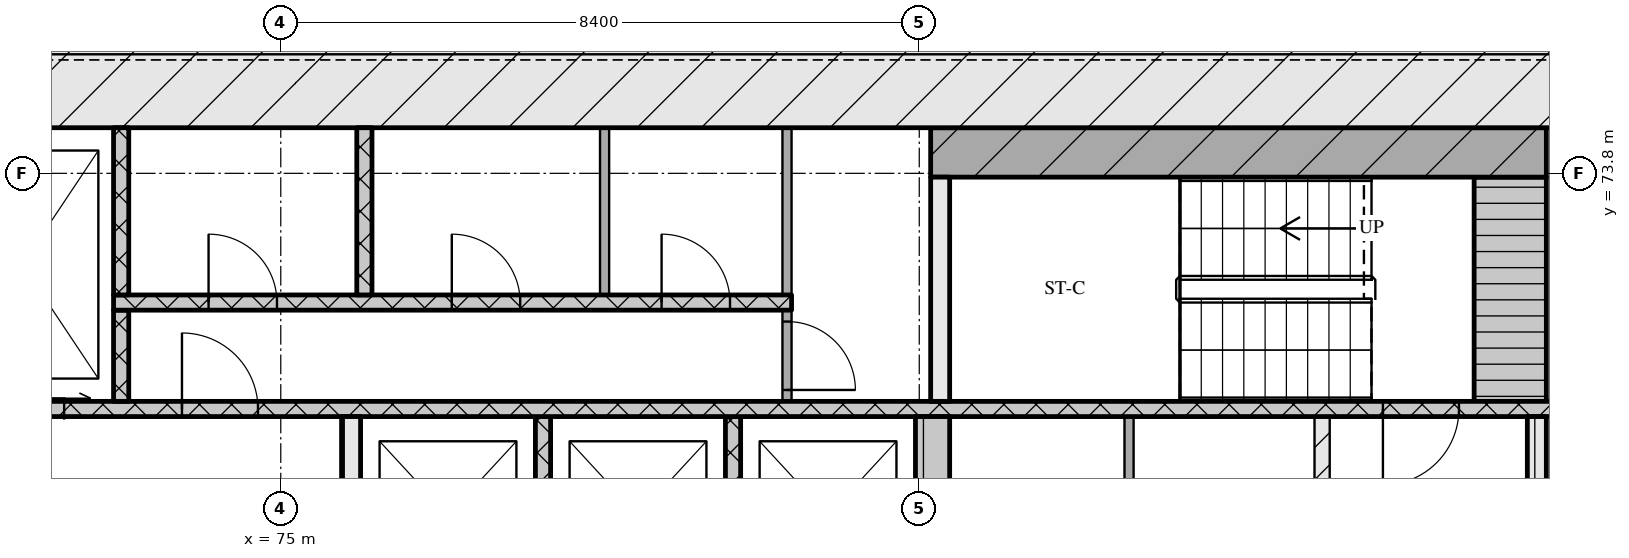
"""IFC4 building model, lengths in metres.
Left out: names, types, materials, properties, quantities, classifications, styles, units other than length and angle.
Written with IfcOpenShell. Run it as: python <this file> out.ifc"""

import sys

from ifc_helpers import new_model, si_unit, direction, frame, frame_2d, origin, place, context, subcontext, project, spatial, rectangle, extrude, element, fill, save


model = new_model("IFC4")
c1 = context("Model", 3, precision=1e-05, world=origin(), true_north=direction((0.0, 1.0)))
c2 = subcontext(c1, "Body", "Model", "MODEL_VIEW")
j1 = project(units=[si_unit("LENGTHUNIT", "METRE"), si_unit("PLANEANGLEUNIT", "RADIAN")], contexts=[c1])
p1 = place(None, origin())
s1 = spatial("IfcSite", under=j1, at=p1, CompositionType="ELEMENT")
p2 = place(p1, origin())
s2 = spatial("IfcBuilding", under=s1, at=p2, CompositionType="ELEMENT")
p3 = place(p2, frame((0.0, 0.0, 37.2)))
s3 = spatial("IfcBuildingStorey", under=s2, at=p3, CompositionType="ELEMENT", Elevation=37.2)
p4 = place(p3, frame((66.6, 75.0, 0.0), z_axis=(0.0, 0.0, 1.0), x_axis=(1.0, 0.0, 0.0)))
e1 = element("IfcWall", 1, at=p4, inside=s3, PredefinedType="SOLIDWALL", context=c2, shape_type="SweptSolid", body=[
    extrude(rectangle(XDim=42.0, YDim=1.2, at=frame_2d((21.0, 0.0))), origin(), (0.0, 0.0, 1.0), 3.32),
])
for number, where, z_axis, x_axis in (
    (2, (78.45, 68.0, 0.0), (0.0, 0.0, 1.0), (0.0, 1.0, 0.0)),
    (3, (80.95, 68.0, 0.0), (0.0, 0.0, 1.0), (0.0, 1.0, 0.0)),
):
    element("IfcWall", number, at=place(p3, frame(where, z_axis=z_axis, x_axis=x_axis)), inside=s3, PredefinedType="SOLIDWALL", context=c2, shape_type="SweptSolid", body=[
        extrude(rectangle(XDim=2.6, YDim=0.2, at=frame_2d((1.3, 0.0))), origin(), (0.0, 0.0, 1.0), 3.32),
    ])
p5 = place(p3, frame((83.575, 68.0, 0.0), z_axis=(0.0, 0.0, 1.0), x_axis=(0.0, 1.0, 0.0)))
e4 = element("IfcWall", 4, at=p5, inside=s3, PredefinedType="SOLIDWALL", context=c2, shape_type="SweptSolid", body=[
    extrude(rectangle(XDim=2.6, YDim=0.45, at=frame_2d((1.3, 0.0))), origin(), (0.0, 0.0, 1.0), 3.32),
])
p6 = place(p3, frame((86.16, 68.0, 0.0), z_axis=(0.0, 0.0, 1.0), x_axis=(0.0, 1.0, 0.0)))
e5 = element("IfcWall", 5, at=p6, inside=s3, PredefinedType="PARTITIONING", context=c2, shape_type="SweptSolid", body=[
    extrude(rectangle(XDim=2.6, YDim=0.12, at=frame_2d((1.3, 0.0))), origin(), (0.0, 0.0, 1.0), 3.32),
])
p7 = place(p3, frame((88.7, 68.0, 0.0), z_axis=(0.0, 0.0, 1.0), x_axis=(0.0, 1.0, 0.0)))
e6 = element("IfcWall", 6, at=p7, inside=s3, PredefinedType="PARTITIONING", context=c2, shape_type="SweptSolid", body=[
    extrude(rectangle(XDim=2.6, YDim=0.2, at=frame_2d((1.3, 0.0))), origin(), (0.0, 0.0, 1.0), 3.32),
])
p8 = place(p3, frame((91.525, 68.0, 0.0), z_axis=(0.0, 0.0, 1.0), x_axis=(0.0, 1.0, 0.0)))
e7 = element("IfcWall", 7, at=p8, inside=s3, PredefinedType="SOLIDWALL", context=c2, shape_type="SweptSolid", body=[
    extrude(rectangle(XDim=2.6, YDim=0.25, at=frame_2d((1.3, 0.0))), origin(), (0.0, 0.0, 1.0), 3.32),
])
p9 = place(p3, frame((75.925, 68.3, 0.0), z_axis=(0.0, 0.0, 1.0), x_axis=(0.0, 1.0, 0.0)))
e8 = element("IfcWall", 8, at=p9, inside=s3, PredefinedType="SOLIDWALL", context=c2, shape_type="SweptSolid", body=[
    extrude(rectangle(XDim=2.3, YDim=0.25, at=frame_2d((1.15, 0.0))), origin(), (0.0, 0.0, 1.0), 3.32),
])
p10 = place(p3, frame((67.8, 70.7, 0.0), z_axis=(0.0, 0.0, 1.0), x_axis=(1.0, 0.0, 0.0)))
e9 = element("IfcWall", 9, at=p10, inside=s3, PredefinedType="SOLIDWALL", context=c2, shape_type="SweptSolid", body=[
    extrude(rectangle(XDim=39.6, YDim=0.2, at=frame_2d((19.8, 0.0))), origin(), (0.0, 0.0, 1.0), 3.32),
])
p11 = place(p10, frame((0.65, 0.0, 0.0)))
e10 = element("IfcOpeningElement", 10, at=p11, cuts=e9, PredefinedType="OPENING", context=c2, shape_type="SweptSolid", body=[
    extrude(rectangle(XDim=1.1, YDim=2.1, at=frame_2d((0.55, 1.05))), frame((0.0, 0.11, 0.0), z_axis=(0.0, -1.0, 0.0), x_axis=(1.0, 0.0, 0.0)), (0.0, 0.0, 1.0), 0.22),
])
p12 = place(p10, frame((3.25, 0.0, 0.0)))
e11 = element("IfcOpeningElement", 11, at=p12, cuts=e9, PredefinedType="OPENING", context=c2, shape_type="SweptSolid", body=[
    extrude(rectangle(XDim=1.1, YDim=2.1, at=frame_2d((0.55, 1.05))), frame((0.0, 0.11, 0.0), z_axis=(0.0, -1.0, 0.0), x_axis=(1.0, 0.0, 0.0)), (0.0, 0.0, 1.0), 0.22),
])
p13 = place(p10, frame((5.9, 0.0, 0.0)))
e12 = element("IfcOpeningElement", 12, at=p13, cuts=e9, PredefinedType="OPENING", context=c2, shape_type="SweptSolid", body=[
    extrude(rectangle(XDim=1.0, YDim=2.1, at=frame_2d((0.5, 1.05))), frame((0.0, 0.11, 0.0), z_axis=(0.0, -1.0, 0.0), x_axis=(1.0, 0.0, 0.0)), (0.0, 0.0, 1.0), 0.22),
])
p14 = place(p10, frame((21.7, 0.0, 0.0)))
e13 = element("IfcOpeningElement", 13, at=p14, cuts=e9, PredefinedType="OPENING", context=c2, shape_type="SweptSolid", body=[
    extrude(rectangle(XDim=1.0, YDim=2.1, at=frame_2d((0.5, 1.05))), frame((0.0, 0.11, 0.0), z_axis=(0.0, -1.0, 0.0), x_axis=(1.0, 0.0, 0.0)), (0.0, 0.0, 1.0), 0.22),
])
p15 = place(p10, frame((32.7, 0.0, 0.0)))
e14 = element("IfcOpeningElement", 14, at=p15, cuts=e9, PredefinedType="OPENING", context=c2, shape_type="SweptSolid", body=[
    extrude(rectangle(XDim=1.0, YDim=2.1, at=frame_2d((0.5, 1.05))), frame((0.0, 0.11, 0.0), z_axis=(0.0, -1.0, 0.0), x_axis=(1.0, 0.0, 0.0)), (0.0, 0.0, 1.0), 0.22),
])
p16 = place(p10, frame((35.25, 0.0, 0.0)))
e15 = element("IfcOpeningElement", 15, at=p16, cuts=e9, PredefinedType="OPENING", context=c2, shape_type="SweptSolid", body=[
    extrude(rectangle(XDim=1.1, YDim=2.1, at=frame_2d((0.55, 1.05))), frame((0.0, 0.11, 0.0), z_axis=(0.0, -1.0, 0.0), x_axis=(1.0, 0.0, 0.0)), (0.0, 0.0, 1.0), 0.22),
])
p17 = place(p10, frame((37.85, 0.0, 0.0)))
e16 = element("IfcOpeningElement", 16, at=p17, cuts=e9, PredefinedType="OPENING", context=c2, shape_type="SweptSolid", body=[
    extrude(rectangle(XDim=1.1, YDim=2.1, at=frame_2d((0.55, 1.05))), frame((0.0, 0.11, 0.0), z_axis=(0.0, -1.0, 0.0), x_axis=(1.0, 0.0, 0.0)), (0.0, 0.0, 1.0), 0.22),
])
p18 = place(p3, frame((72.9, 70.8, 0.0), z_axis=(0.0, 0.0, 1.0), x_axis=(0.0, 1.0, 0.0)))
e17 = element("IfcWall", 17, at=p18, inside=s3, PredefinedType="SOLIDWALL", context=c2, shape_type="SweptSolid", body=[
    extrude(rectangle(XDim=1.2, YDim=0.2, at=frame_2d((0.6, 0.0))), origin(), (0.0, 0.0, 1.0), 3.32),
])
p19 = place(p3, frame((81.66, 70.8, 0.0), z_axis=(0.0, 0.0, 1.0), x_axis=(0.0, 1.0, 0.0)))
e18 = element("IfcWall", 18, at=p19, inside=s3, PredefinedType="PARTITIONING", context=c2, shape_type="SweptSolid", body=[
    extrude(rectangle(XDim=1.2, YDim=0.12, at=frame_2d((0.6, 0.0))), origin(), (0.0, 0.0, 1.0), 3.32),
])
p20 = place(p19, frame((0.15, 0.0, 0.0)))
e19 = element("IfcOpeningElement", 19, at=p20, cuts=e18, PredefinedType="OPENING", context=c2, shape_type="SweptSolid", body=[
    extrude(rectangle(XDim=0.9, YDim=2.1, at=frame_2d((0.45, 1.05))), frame((0.0, 0.07, 0.0), z_axis=(0.0, -1.0, 0.0), x_axis=(1.0, 0.0, 0.0)), (0.0, 0.0, 1.0), 0.14),
])
p21 = place(p3, frame((83.675, 70.8, 0.0), z_axis=(0.0, 0.0, 1.0), x_axis=(0.0, 1.0, 0.0)))
e20 = element("IfcWall", 20, at=p21, inside=s3, PredefinedType="SOLIDWALL", context=c2, shape_type="SweptSolid", body=[
    extrude(rectangle(XDim=2.95, YDim=0.25, at=frame_2d((1.475, 0.0))), origin(), (0.0, 0.0, 1.0), 3.32),
])
p22 = place(p3, frame((91.175, 70.8, 0.0), z_axis=(0.0, 0.0, 1.0), x_axis=(0.0, 1.0, 0.0)))
e21 = element("IfcWall", 21, at=p22, inside=s3, PredefinedType="SOLIDWALL", context=c2, shape_type="SweptSolid", body=[
    extrude(rectangle(XDim=2.95, YDim=0.95, at=frame_2d((1.475, 0.0))), origin(), (0.0, 0.0, 1.0), 3.32),
])
p23 = place(p3, frame((72.8, 72.1, 0.0), z_axis=(0.0, 0.0, 1.0), x_axis=(1.0, 0.0, 0.0)))
e22 = element("IfcWall", 22, at=p23, inside=s3, PredefinedType="SOLIDWALL", context=c2, shape_type="SweptSolid", body=[
    extrude(rectangle(XDim=8.92, YDim=0.2, at=frame_2d((4.46, 0.0))), origin(), (0.0, 0.0, 1.0), 3.32),
])
p24 = place(p23, frame((1.25, 0.0, 0.0)))
e23 = element("IfcOpeningElement", 23, at=p24, cuts=e22, PredefinedType="OPENING", context=c2, shape_type="SweptSolid", body=[
    extrude(rectangle(XDim=0.9, YDim=2.1, at=frame_2d((0.45, 1.05))), frame((0.0, 0.11, 0.0), z_axis=(0.0, -1.0, 0.0), x_axis=(1.0, 0.0, 0.0)), (0.0, 0.0, 1.0), 0.22),
])
p25 = place(p23, frame((4.45, 0.0, 0.0)))
e24 = element("IfcOpeningElement", 24, at=p25, cuts=e22, PredefinedType="OPENING", context=c2, shape_type="SweptSolid", body=[
    extrude(rectangle(XDim=0.9, YDim=2.1, at=frame_2d((0.45, 1.05))), frame((0.0, 0.11, 0.0), z_axis=(0.0, -1.0, 0.0), x_axis=(1.0, 0.0, 0.0)), (0.0, 0.0, 1.0), 0.22),
])
p26 = place(p23, frame((7.21, 0.0, 0.0)))
e25 = element("IfcOpeningElement", 25, at=p26, cuts=e22, PredefinedType="OPENING", context=c2, shape_type="SweptSolid", body=[
    extrude(rectangle(XDim=0.9, YDim=2.1, at=frame_2d((0.45, 1.05))), frame((0.0, 0.11, 0.0), z_axis=(0.0, -1.0, 0.0), x_axis=(1.0, 0.0, 0.0)), (0.0, 0.0, 1.0), 0.22),
])
for number, where, z_axis, x_axis in (
    (26, (72.9, 72.2, 0.0), (0.0, 0.0, 1.0), (0.0, 1.0, 0.0)),
    (27, (76.1, 72.2, 0.0), (0.0, 0.0, 1.0), (0.0, 1.0, 0.0)),
):
    element("IfcWall", number, at=place(p3, frame(where, z_axis=z_axis, x_axis=x_axis)), inside=s3, PredefinedType="SOLIDWALL", context=c2, shape_type="SweptSolid", body=[
        extrude(rectangle(XDim=2.2, YDim=0.2, at=frame_2d((1.1, 0.0))), origin(), (0.0, 0.0, 1.0), 3.32),
    ])
for number, where, z_axis, x_axis in (
    (28, (79.26, 72.2, 0.0), (0.0, 0.0, 1.0), (0.0, 1.0, 0.0)),
    (29, (81.66, 72.2, 0.0), (0.0, 0.0, 1.0), (0.0, 1.0, 0.0)),
):
    element("IfcWall", number, at=place(p3, frame(where, z_axis=z_axis, x_axis=x_axis)), inside=s3, PredefinedType="PARTITIONING", context=c2, shape_type="SweptSolid", body=[
        extrude(rectangle(XDim=2.2, YDim=0.12, at=frame_2d((1.1, 0.0))), origin(), (0.0, 0.0, 1.0), 3.32),
    ])
p27 = place(p3, frame((83.55, 74.075, 0.0), z_axis=(0.0, 0.0, 1.0), x_axis=(1.0, 0.0, 0.0)))
e30 = element("IfcWall", 30, at=p27, inside=s3, PredefinedType="SOLIDWALL", context=c2, shape_type="SweptSolid", body=[
    extrude(rectangle(XDim=8.1, YDim=0.65, at=frame_2d((4.05, 0.0))), origin(), (0.0, 0.0, 1.0), 3.32),
])
p28 = place(p12, origin())
e31 = element("IfcDoor", 31, at=p28, inside=s3, OperationType="SLIDING_TO_RIGHT", PredefinedType="DOOR", context=c2, shape_type="SweptSolid", body=[
    extrude(rectangle(XDim=1.1, YDim=2.1, at=frame_2d((0.55, 1.05))), frame((0.0, 0.025, 0.0), z_axis=(0.0, -1.0, 0.0), x_axis=(1.0, 0.0, 0.0)), (0.0, 0.0, 1.0), 0.05),
])
fill(e11, e31)
p29 = place(p13, origin())
e32 = element("IfcDoor", 32, at=p29, inside=s3, OperationType="SINGLE_SWING_LEFT", PredefinedType="DOOR", context=c2, shape_type="SweptSolid", body=[
    extrude(rectangle(XDim=1.0, YDim=2.1, at=frame_2d((0.5, 1.05))), frame((0.0, 0.025, 0.0), z_axis=(0.0, -1.0, 0.0), x_axis=(1.0, 0.0, 0.0)), (0.0, 0.0, 1.0), 0.05),
])
fill(e12, e32)
p30 = place(p14, origin())
e33 = element("IfcDoor", 33, at=p30, inside=s3, OperationType="SINGLE_SWING_RIGHT", PredefinedType="DOOR", context=c2, shape_type="SweptSolid", body=[
    extrude(rectangle(XDim=1.0, YDim=2.1, at=frame_2d((0.5, 1.05))), frame((0.0, 0.025, 0.0), z_axis=(0.0, -1.0, 0.0), x_axis=(1.0, 0.0, 0.0)), (0.0, 0.0, 1.0), 0.05),
])
fill(e13, e33)
p31 = place(p20, origin())
e34 = element("IfcDoor", 34, at=p31, inside=s3, OperationType="SINGLE_SWING_RIGHT", PredefinedType="DOOR", context=c2, shape_type="SweptSolid", body=[
    extrude(rectangle(XDim=0.9, YDim=2.1, at=frame_2d((0.45, 1.05))), frame((0.0, 0.025, 0.0), z_axis=(0.0, -1.0, 0.0), x_axis=(1.0, 0.0, 0.0)), (0.0, 0.0, 1.0), 0.05),
])
fill(e19, e34)
p32 = place(p24, origin())
e35 = element("IfcDoor", 35, at=p32, inside=s3, OperationType="SINGLE_SWING_LEFT", PredefinedType="DOOR", context=c2, shape_type="SweptSolid", body=[
    extrude(rectangle(XDim=0.9, YDim=2.1, at=frame_2d((0.45, 1.05))), frame((0.0, 0.025, 0.0), z_axis=(0.0, -1.0, 0.0), x_axis=(1.0, 0.0, 0.0)), (0.0, 0.0, 1.0), 0.05),
])
fill(e23, e35)
p33 = place(p25, origin())
e36 = element("IfcDoor", 36, at=p33, inside=s3, OperationType="SINGLE_SWING_LEFT", PredefinedType="DOOR", context=c2, shape_type="SweptSolid", body=[
    extrude(rectangle(XDim=0.9, YDim=2.1, at=frame_2d((0.45, 1.05))), frame((0.0, 0.025, 0.0), z_axis=(0.0, -1.0, 0.0), x_axis=(1.0, 0.0, 0.0)), (0.0, 0.0, 1.0), 0.05),
])
fill(e24, e36)
p34 = place(p26, origin())
e37 = element("IfcDoor", 37, at=p34, inside=s3, OperationType="SINGLE_SWING_LEFT", PredefinedType="DOOR", context=c2, shape_type="SweptSolid", body=[
    extrude(rectangle(XDim=0.9, YDim=2.1, at=frame_2d((0.45, 1.05))), frame((0.0, 0.025, 0.0), z_axis=(0.0, -1.0, 0.0), x_axis=(1.0, 0.0, 0.0)), (0.0, 0.0, 1.0), 0.05),
])
fill(e25, e37)
save(model, sys.argv[1])
